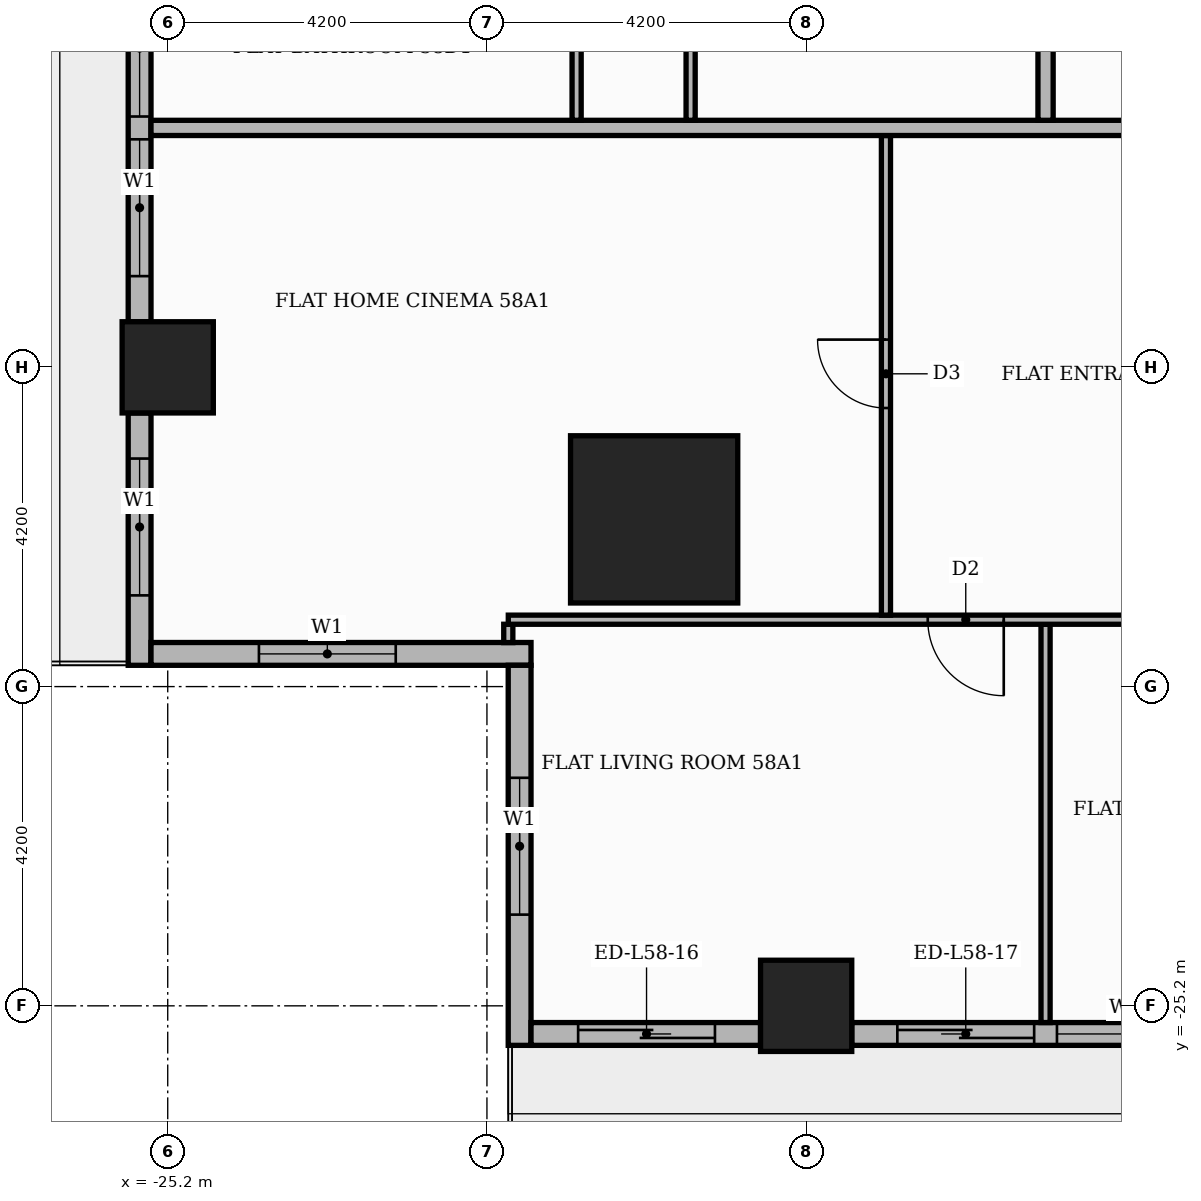
"""IFC4 building model, lengths in metres.
Left out: names, types, materials, properties, quantities, classifications, styles, units other than length and angle.
Written with IfcOpenShell. Run it as: python <this file> out.ifc"""

import sys

from ifc_helpers import new_model, si_unit, direction, frame, frame_2d, origin, origin_2d, place, context, subcontext, project, spatial, rectangle, extrude, element, fill, save


model = new_model("IFC4")
c1 = context("Model", 3, precision=1e-05, world=origin(), true_north=direction((0.0, 1.0)))
c2 = subcontext(c1, "Body", "Model", "MODEL_VIEW")
j1 = project(units=[si_unit("LENGTHUNIT", "METRE"), si_unit("PLANEANGLEUNIT", "RADIAN")], contexts=[c1])
p1 = place(None, origin())
s1 = spatial("IfcSite", under=j1, at=p1, CompositionType="ELEMENT")
p2 = place(p1, origin())
s2 = spatial("IfcBuilding", under=s1, at=p2, CompositionType="ELEMENT")
p3 = place(p2, frame((0.0, 0.0, 244.5)))
s3 = spatial("IfcBuildingStorey", under=s2, at=p3, CompositionType="ELEMENT", Elevation=244.5)
p4 = place(p3, frame((-18.8, -18.8, 0.0), z_axis=(0.0, 0.0, 1.0), x_axis=(1.0, 0.0, 0.0)))
e1 = element("IfcColumn", 1, at=p4, inside=s3, PredefinedType="COLUMN", context=c2, shape_type="SweptSolid", body=[
    extrude(rectangle(XDim=2.2, YDim=2.2, at=origin_2d()), origin(), (0.0, 0.0, 1.0), 3.9),
])
for number, where, z_axis, x_axis in (
    (2, (-16.8, -25.2, 0.0), (0.0, 0.0, 1.0), (1.0, 0.0, 0.0)),
    (3, (-25.2, -16.8, 0.0), (0.0, 0.0, 1.0), (1.0, 0.0, 0.0)),
):
    element("IfcColumn", number, at=place(p3, frame(where, z_axis=z_axis, x_axis=x_axis)), inside=s3, PredefinedType="COLUMN", context=c2, shape_type="SweptSolid", body=[
        extrude(rectangle(XDim=1.2, YDim=1.2, at=origin_2d()), origin(), (0.0, 0.0, 1.0), 3.9),
    ])
p5 = place(p3, frame((-25.57, -9.0, 0.0), z_axis=(0.0, 0.0, 1.0), x_axis=(0.0, -1.0, 0.0)))
e4 = element("IfcWall", 4, at=p5, inside=s3, PredefinedType="STANDARD", context=c2, shape_type="SweptSolid", body=[
    extrude(rectangle(XDim=7.2, YDim=0.3, at=frame_2d((3.6, 0.0))), origin(), (0.0, 0.0, 1.0), 3.48),
])
p6 = place(p5, frame((0.6, 0.0, 0.9)))
e5 = element("IfcOpeningElement", 5, at=p6, cuts=e4, PredefinedType="OPENING", context=c2, shape_type="SweptSolid", body=[
    extrude(rectangle(XDim=1.8, YDim=2.1, at=frame_2d((0.9, 1.05))), frame((0.0, 0.16, 0.0), z_axis=(0.0, -1.0, 0.0), x_axis=(1.0, 0.0, 0.0)), (0.0, 0.0, 1.0), 0.32),
])
p7 = place(p5, frame((2.7, 0.0, 0.9)))
e6 = element("IfcOpeningElement", 6, at=p7, cuts=e4, PredefinedType="OPENING", context=c2, shape_type="SweptSolid", body=[
    extrude(rectangle(XDim=1.8, YDim=2.1, at=frame_2d((0.9, 1.05))), frame((0.0, 0.16, 0.0), z_axis=(0.0, -1.0, 0.0), x_axis=(1.0, 0.0, 0.0)), (0.0, 0.0, 1.0), 0.32),
])
p8 = place(p5, frame((4.8, 0.0, 0.9)))
e7 = element("IfcOpeningElement", 7, at=p8, cuts=e4, PredefinedType="OPENING", context=c2, shape_type="SweptSolid", body=[
    extrude(rectangle(XDim=1.8, YDim=2.1, at=frame_2d((0.9, 1.05))), frame((0.0, 0.16, 0.0), z_axis=(0.0, -1.0, 0.0), x_axis=(1.0, 0.0, 0.0)), (0.0, 0.0, 1.0), 0.32),
])
p9 = place(p3, frame((-25.57, -17.4, 0.0), z_axis=(0.0, 0.0, 1.0), x_axis=(0.0, -1.0, 0.0)))
e8 = element("IfcWall", 8, at=p9, inside=s3, PredefinedType="STANDARD", context=c2, shape_type="SweptSolid", body=[
    extrude(rectangle(XDim=3.32, YDim=0.3, at=frame_2d((1.66, 0.0))), origin(), (0.0, 0.0, 1.0), 3.48),
])
p10 = place(p9, frame((0.6, 0.0, 0.9)))
e9 = element("IfcOpeningElement", 9, at=p10, cuts=e8, PredefinedType="OPENING", context=c2, shape_type="SweptSolid", body=[
    extrude(rectangle(XDim=1.8, YDim=2.1, at=frame_2d((0.9, 1.05))), frame((0.0, 0.16, 0.0), z_axis=(0.0, -1.0, 0.0), x_axis=(1.0, 0.0, 0.0)), (0.0, 0.0, 1.0), 0.32),
])
p11 = place(p3, frame((-25.42, -20.57, 0.0), z_axis=(0.0, 0.0, 1.0), x_axis=(1.0, 0.0, 0.0)))
e10 = element("IfcWall", 10, at=p11, inside=s3, PredefinedType="STANDARD", context=c2, shape_type="SweptSolid", body=[
    extrude(rectangle(XDim=5.0, YDim=0.3, at=frame_2d((2.5, 0.0))), origin(), (0.0, 0.0, 1.0), 3.48),
])
p12 = place(p11, frame((1.42, 0.0, 0.9)))
e11 = element("IfcOpeningElement", 11, at=p12, cuts=e10, PredefinedType="OPENING", context=c2, shape_type="SweptSolid", body=[
    extrude(rectangle(XDim=1.8, YDim=2.1, at=frame_2d((0.9, 1.05))), frame((0.0, 0.16, 0.0), z_axis=(0.0, -1.0, 0.0), x_axis=(1.0, 0.0, 0.0)), (0.0, 0.0, 1.0), 0.32),
])
p13 = place(p3, frame((-20.57, -20.72, 0.0), z_axis=(0.0, 0.0, 1.0), x_axis=(0.0, -1.0, 0.0)))
e12 = element("IfcWall", 12, at=p13, inside=s3, PredefinedType="STANDARD", context=c2, shape_type="SweptSolid", body=[
    extrude(rectangle(XDim=5.0, YDim=0.3, at=frame_2d((2.5, 0.0))), origin(), (0.0, 0.0, 1.0), 3.48),
])
p14 = place(p13, frame((1.48, 0.0, 0.9)))
e13 = element("IfcOpeningElement", 13, at=p14, cuts=e12, PredefinedType="OPENING", context=c2, shape_type="SweptSolid", body=[
    extrude(rectangle(XDim=1.8, YDim=2.1, at=frame_2d((0.9, 1.05))), frame((0.0, 0.16, 0.0), z_axis=(0.0, -1.0, 0.0), x_axis=(1.0, 0.0, 0.0)), (0.0, 0.0, 1.0), 0.32),
])
p15 = place(p3, frame((-20.42, -25.57, 0.0), z_axis=(0.0, 0.0, 1.0), x_axis=(1.0, 0.0, 0.0)))
e14 = element("IfcWall", 14, at=p15, inside=s3, PredefinedType="STANDARD", context=c2, shape_type="SweptSolid", body=[
    extrude(rectangle(XDim=3.02, YDim=0.3, at=frame_2d((1.51, 0.0))), origin(), (0.0, 0.0, 1.0), 3.48),
])
p16 = place(p15, frame((0.62, 0.0, 0.0)))
e15 = element("IfcOpeningElement", 15, at=p16, cuts=e14, PredefinedType="OPENING", context=c2, shape_type="SweptSolid", body=[
    extrude(rectangle(XDim=1.8, YDim=2.4, at=frame_2d((0.9, 1.2))), frame((0.0, 0.16, 0.0), z_axis=(0.0, -1.0, 0.0), x_axis=(1.0, 0.0, 0.0)), (0.0, 0.0, 1.0), 0.32),
])
p17 = place(p3, frame((-16.2, -25.57, 0.0), z_axis=(0.0, 0.0, 1.0), x_axis=(1.0, 0.0, 0.0)))
e16 = element("IfcWall", 16, at=p17, inside=s3, PredefinedType="STANDARD", context=c2, shape_type="SweptSolid", body=[
    extrude(rectangle(XDim=7.2, YDim=0.3, at=frame_2d((3.6, 0.0))), origin(), (0.0, 0.0, 1.0), 3.48),
])
p18 = place(p17, frame((0.6, 0.0, 0.0)))
e17 = element("IfcOpeningElement", 17, at=p18, cuts=e16, PredefinedType="OPENING", context=c2, shape_type="SweptSolid", body=[
    extrude(rectangle(XDim=1.8, YDim=2.4, at=frame_2d((0.9, 1.2))), frame((0.0, 0.16, 0.0), z_axis=(0.0, -1.0, 0.0), x_axis=(1.0, 0.0, 0.0)), (0.0, 0.0, 1.0), 0.32),
])
p19 = place(p17, frame((2.7, 0.0, 0.9)))
e18 = element("IfcOpeningElement", 18, at=p19, cuts=e16, PredefinedType="OPENING", context=c2, shape_type="SweptSolid", body=[
    extrude(rectangle(XDim=1.8, YDim=2.1, at=frame_2d((0.9, 1.05))), frame((0.0, 0.16, 0.0), z_axis=(0.0, -1.0, 0.0), x_axis=(1.0, 0.0, 0.0)), (0.0, 0.0, 1.0), 0.32),
])
p20 = place(p17, frame((4.8, 0.0, 0.0)))
e19 = element("IfcOpeningElement", 19, at=p20, cuts=e16, PredefinedType="OPENING", context=c2, shape_type="SweptSolid", body=[
    extrude(rectangle(XDim=1.8, YDim=2.4, at=frame_2d((0.9, 1.2))), frame((0.0, 0.16, 0.0), z_axis=(0.0, -1.0, 0.0), x_axis=(1.0, 0.0, 0.0)), (0.0, 0.0, 1.0), 0.32),
])
p21 = place(p3, frame((-13.65, -25.42, 0.0), z_axis=(0.0, 0.0, 1.0), x_axis=(0.0, 1.0, 0.0)))
e20 = element("IfcWall", 20, at=p21, inside=s3, PredefinedType="PARTITIONING", context=c2, shape_type="SweptSolid", body=[
    extrude(rectangle(XDim=5.24, YDim=0.12, at=frame_2d((2.62, 0.0))), origin(), (0.0, 0.0, 1.0), 3.48),
])
p22 = place(p3, frame((-20.719, -20.421, 0.0), z_axis=(0.0, 0.0, 1.0), x_axis=(0.0, 1.0, 0.0)))
e21 = element("IfcWall", 21, at=p22, inside=s3, PredefinedType="PARTITIONING", context=c2, shape_type="SweptSolid", body=[
    extrude(rectangle(XDim=0.241, YDim=0.12, at=frame_2d((0.121, 0.0))), origin(), (0.0, 0.0, 1.0), 3.48),
])
p23 = place(p3, frame((-20.719, -20.12, 0.0), z_axis=(0.0, 0.0, 1.0), x_axis=(1.0, 0.0, 0.0)))
e22 = element("IfcWall", 22, at=p23, inside=s3, PredefinedType="PARTITIONING", context=c2, shape_type="SweptSolid", body=[
    extrude(rectangle(XDim=17.569, YDim=0.12, at=frame_2d((8.785, 0.0))), origin(), (0.0, 0.0, 1.0), 3.48),
])
p24 = place(p23, frame((5.519, 0.0, 0.0)))
e23 = element("IfcOpeningElement", 23, at=p24, cuts=e22, PredefinedType="OPENING", context=c2, shape_type="SweptSolid", body=[
    extrude(rectangle(XDim=1.0, YDim=2.1, at=frame_2d((0.5, 1.05))), frame((0.0, 0.07, 0.0), z_axis=(0.0, -1.0, 0.0), x_axis=(1.0, 0.0, 0.0)), (0.0, 0.0, 1.0), 0.14),
])
p25 = place(p23, frame((9.769, 0.0, 0.0)))
e24 = element("IfcOpeningElement", 24, at=p25, cuts=e22, PredefinedType="OPENING", context=c2, shape_type="SweptSolid", body=[
    extrude(rectangle(XDim=0.9, YDim=2.1, at=frame_2d((0.45, 1.05))), frame((0.0, 0.07, 0.0), z_axis=(0.0, -1.0, 0.0), x_axis=(1.0, 0.0, 0.0)), (0.0, 0.0, 1.0), 0.14),
])
p26 = place(p3, frame((-15.75, -20.06, 0.0), z_axis=(0.0, 0.0, 1.0), x_axis=(0.0, 1.0, 0.0)))
e25 = element("IfcWall", 25, at=p26, inside=s3, PredefinedType="PARTITIONING", context=c2, shape_type="SweptSolid", body=[
    extrude(rectangle(XDim=6.31, YDim=0.12, at=frame_2d((3.155, 0.0))), origin(), (0.0, 0.0, 1.0), 3.48),
])
p27 = place(p26, frame((2.725, 0.0, 0.0)))
e26 = element("IfcOpeningElement", 26, at=p27, cuts=e25, PredefinedType="OPENING", context=c2, shape_type="SweptSolid", body=[
    extrude(rectangle(XDim=0.9, YDim=2.1, at=frame_2d((0.45, 1.05))), frame((0.0, 0.07, 0.0), z_axis=(0.0, -1.0, 0.0), x_axis=(1.0, 0.0, 0.0)), (0.0, 0.0, 1.0), 0.14),
])
p28 = place(p3, frame((-25.42, -13.65, 0.0), z_axis=(0.0, 0.0, 1.0), x_axis=(1.0, 0.0, 0.0)))
e27 = element("IfcWall", 27, at=p28, inside=s3, PredefinedType="PARTITIONING", context=c2, shape_type="SweptSolid", body=[
    extrude(rectangle(XDim=39.07, YDim=0.2, at=frame_2d((19.535, 0.0))), origin(), (0.0, 0.0, 1.0), 3.48),
])
p29 = place(p28, frame((13.32, 0.0, 0.0)))
e28 = element("IfcOpeningElement", 28, at=p29, cuts=e27, PredefinedType="OPENING", context=c2, shape_type="SweptSolid", body=[
    extrude(rectangle(XDim=1.1, YDim=2.4, at=frame_2d((0.55, 1.2))), frame((0.0, 0.11, 0.0), z_axis=(0.0, -1.0, 0.0), x_axis=(1.0, 0.0, 0.0)), (0.0, 0.0, 1.0), 0.22),
])
p30 = place(p3, frame((-19.82, -13.55, 0.0), z_axis=(0.0, 0.0, 1.0), x_axis=(0.0, 1.0, 0.0)))
e29 = element("IfcWall", 29, at=p30, inside=s3, PredefinedType="PARTITIONING", context=c2, shape_type="SweptSolid", body=[
    extrude(rectangle(XDim=1.94, YDim=0.12, at=frame_2d((0.97, 0.0))), origin(), (0.0, 0.0, 1.0), 3.48),
])
p31 = place(p3, frame((-18.32, -13.55, 0.0), z_axis=(0.0, 0.0, 1.0), x_axis=(0.0, 1.0, 0.0)))
e30 = element("IfcWall", 30, at=p31, inside=s3, PredefinedType="PARTITIONING", context=c2, shape_type="SweptSolid", body=[
    extrude(rectangle(XDim=3.59, YDim=0.12, at=frame_2d((1.795, 0.0))), origin(), (0.0, 0.0, 1.0), 3.48),
])
p32 = place(p31, frame((1.325, 0.0, 0.0)))
e31 = element("IfcOpeningElement", 31, at=p32, cuts=e30, PredefinedType="OPENING", context=c2, shape_type="SweptSolid", body=[
    extrude(rectangle(XDim=0.9, YDim=2.1, at=frame_2d((0.45, 1.05))), frame((0.0, 0.07, 0.0), z_axis=(0.0, -1.0, 0.0), x_axis=(1.0, 0.0, 0.0)), (0.0, 0.0, 1.0), 0.14),
])
p33 = place(p3, frame((-13.65, -13.55, 0.0), z_axis=(0.0, 0.0, 1.0), x_axis=(0.0, 1.0, 0.0)))
e32 = element("IfcWall", 32, at=p33, inside=s3, PredefinedType="PARTITIONING", context=c2, shape_type="SweptSolid", body=[
    extrude(rectangle(XDim=2.45, YDim=0.2, at=frame_2d((1.225, 0.0))), origin(), (0.0, 0.0, 1.0), 3.48),
])
p34 = place(p7, origin())
e33 = element("IfcWindow", 33, at=p34, inside=s3, PartitioningType="SINGLE_PANEL", PredefinedType="WINDOW", context=c2, shape_type="SweptSolid", body=[
    extrude(rectangle(XDim=1.8, YDim=2.1, at=frame_2d((0.9, 1.05))), frame((0.0, 0.03, 0.0), z_axis=(0.0, -1.0, 0.0), x_axis=(1.0, 0.0, 0.0)), (0.0, 0.0, 1.0), 0.06),
])
fill(e6, e33)
p35 = place(p8, origin())
e34 = element("IfcWindow", 34, at=p35, inside=s3, PartitioningType="SINGLE_PANEL", PredefinedType="WINDOW", context=c2, shape_type="SweptSolid", body=[
    extrude(rectangle(XDim=1.8, YDim=2.1, at=frame_2d((0.9, 1.05))), frame((0.0, 0.03, 0.0), z_axis=(0.0, -1.0, 0.0), x_axis=(1.0, 0.0, 0.0)), (0.0, 0.0, 1.0), 0.06),
])
fill(e7, e34)
p36 = place(p10, origin())
e35 = element("IfcWindow", 35, at=p36, inside=s3, PartitioningType="SINGLE_PANEL", PredefinedType="WINDOW", context=c2, shape_type="SweptSolid", body=[
    extrude(rectangle(XDim=1.8, YDim=2.1, at=frame_2d((0.9, 1.05))), frame((0.0, 0.03, 0.0), z_axis=(0.0, -1.0, 0.0), x_axis=(1.0, 0.0, 0.0)), (0.0, 0.0, 1.0), 0.06),
])
fill(e9, e35)
p37 = place(p12, origin())
e36 = element("IfcWindow", 36, at=p37, inside=s3, PartitioningType="SINGLE_PANEL", PredefinedType="WINDOW", context=c2, shape_type="SweptSolid", body=[
    extrude(rectangle(XDim=1.8, YDim=2.1, at=frame_2d((0.9, 1.05))), frame((0.0, 0.03, 0.0), z_axis=(0.0, -1.0, 0.0), x_axis=(1.0, 0.0, 0.0)), (0.0, 0.0, 1.0), 0.06),
])
fill(e11, e36)
p38 = place(p14, origin())
e37 = element("IfcWindow", 37, at=p38, inside=s3, PartitioningType="SINGLE_PANEL", PredefinedType="WINDOW", context=c2, shape_type="SweptSolid", body=[
    extrude(rectangle(XDim=1.8, YDim=2.1, at=frame_2d((0.9, 1.05))), frame((0.0, 0.03, 0.0), z_axis=(0.0, -1.0, 0.0), x_axis=(1.0, 0.0, 0.0)), (0.0, 0.0, 1.0), 0.06),
])
fill(e13, e37)
p39 = place(p16, origin())
e38 = element("IfcDoor", 38, at=p39, inside=s3, OperationType="SLIDING_TO_RIGHT", PredefinedType="DOOR", context=c2, shape_type="SweptSolid", body=[
    extrude(rectangle(XDim=1.8, YDim=2.4, at=frame_2d((0.9, 1.2))), frame((0.0, 0.025, 0.0), z_axis=(0.0, -1.0, 0.0), x_axis=(1.0, 0.0, 0.0)), (0.0, 0.0, 1.0), 0.05),
])
fill(e15, e38)
p40 = place(p18, origin())
e39 = element("IfcDoor", 39, at=p40, inside=s3, OperationType="SLIDING_TO_LEFT", PredefinedType="DOOR", context=c2, shape_type="SweptSolid", body=[
    extrude(rectangle(XDim=1.8, YDim=2.4, at=frame_2d((0.9, 1.2))), frame((0.0, 0.025, 0.0), z_axis=(0.0, -1.0, 0.0), x_axis=(1.0, 0.0, 0.0)), (0.0, 0.0, 1.0), 0.05),
])
fill(e17, e39)
p41 = place(p19, origin())
e40 = element("IfcWindow", 40, at=p41, inside=s3, PartitioningType="SINGLE_PANEL", PredefinedType="WINDOW", context=c2, shape_type="SweptSolid", body=[
    extrude(rectangle(XDim=1.8, YDim=2.1, at=frame_2d((0.9, 1.05))), frame((0.0, 0.03, 0.0), z_axis=(0.0, -1.0, 0.0), x_axis=(1.0, 0.0, 0.0)), (0.0, 0.0, 1.0), 0.06),
])
fill(e18, e40)
p42 = place(p27, origin())
e41 = element("IfcDoor", 41, at=p42, inside=s3, OperationType="SINGLE_SWING_RIGHT", PredefinedType="DOOR", context=c2, shape_type="SweptSolid", body=[
    extrude(rectangle(XDim=0.9, YDim=2.1, at=frame_2d((0.45, 1.05))), frame((0.0, 0.025, 0.0), z_axis=(0.0, -1.0, 0.0), x_axis=(1.0, 0.0, 0.0)), (0.0, 0.0, 1.0), 0.05),
])
fill(e26, e41)
p43 = place(p24, frame((1.0, 0.0, 0.0), z_axis=(0.0, 0.0, 1.0), x_axis=(-1.0, 0.0, 0.0)))
e42 = element("IfcDoor", 42, at=p43, inside=s3, OperationType="SINGLE_SWING_RIGHT", PredefinedType="DOOR", context=c2, shape_type="SweptSolid", body=[
    extrude(rectangle(XDim=1.0, YDim=2.1, at=frame_2d((0.5, 1.05))), frame((0.0, 0.025, 0.0), z_axis=(0.0, -1.0, 0.0), x_axis=(1.0, 0.0, 0.0)), (0.0, 0.0, 1.0), 0.05),
])
fill(e23, e42)
save(model, sys.argv[1])
